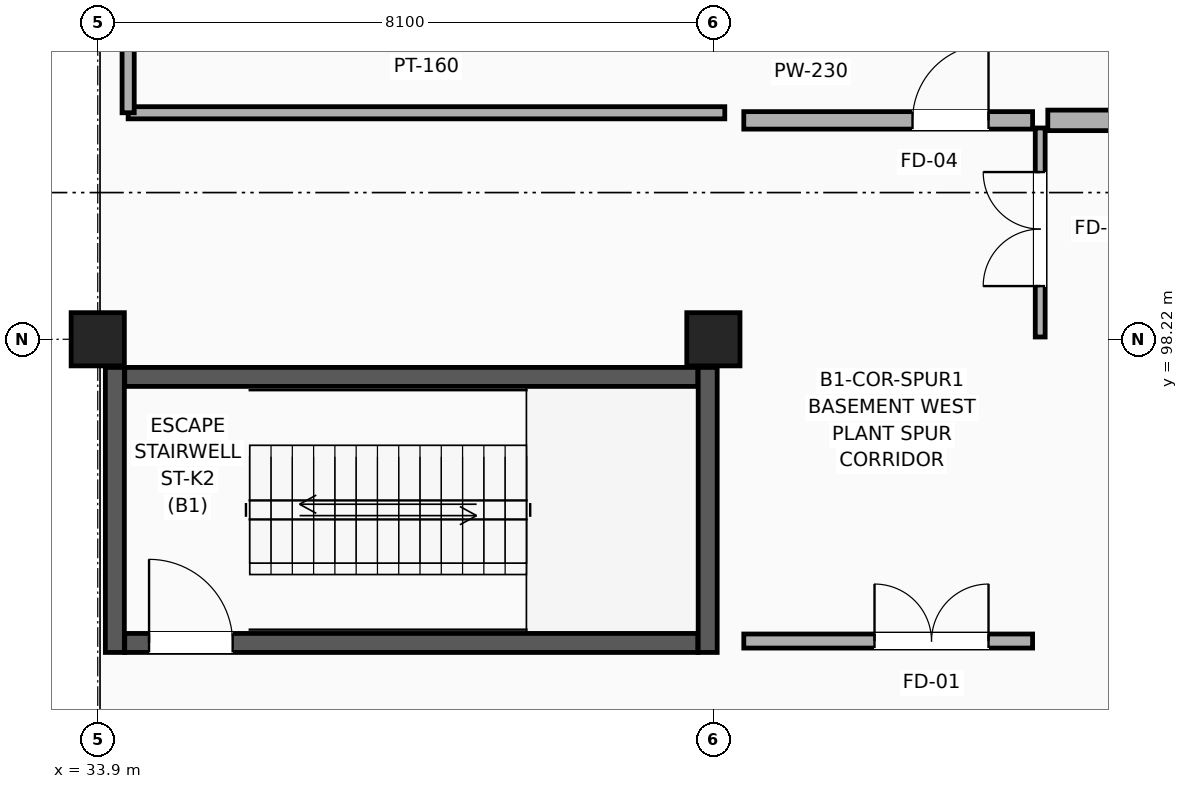
"""IFC4 building model, lengths in metres.
Left out: names, types, materials, properties, quantities, classifications, styles, units other than length and angle.
Written with IfcOpenShell. Run it as: python <this file> out.ifc"""

import sys

from ifc_helpers import new_model, si_unit, direction, frame, frame_2d, origin, origin_2d, place, context, subcontext, project, spatial, rectangle, extrude, element, fill, save


model = new_model("IFC4")
c1 = context("Model", 3, precision=1e-05, world=origin(), true_north=direction((0.0, 1.0)))
c2 = subcontext(c1, "Body", "Model", "MODEL_VIEW")
j1 = project(units=[si_unit("LENGTHUNIT", "METRE"), si_unit("PLANEANGLEUNIT", "RADIAN")], contexts=[c1])
p1 = place(None, origin())
s1 = spatial("IfcSite", under=j1, at=p1, CompositionType="ELEMENT")
p2 = place(p1, origin())
s2 = spatial("IfcBuilding", under=s1, at=p2, CompositionType="ELEMENT")
p3 = place(p2, frame((0.0, 0.0, -4.8)))
s3 = spatial("IfcBuildingStorey", under=s2, at=p3, CompositionType="ELEMENT", Elevation=-4.8)
for number, where, z_axis, x_axis in (
    (1, (33.9, 98.22, 0.0), (0.0, 0.0, 1.0), (1.0, 0.0, 0.0)),
    (2, (42.0, 98.22, 0.0), (0.0, 0.0, 1.0), (1.0, 0.0, 0.0)),
):
    element("IfcColumn", number, at=place(p3, frame(where, z_axis=z_axis, x_axis=x_axis)), inside=s3, PredefinedType="COLUMN", context=c2, shape_type="SweptSolid", body=[
        extrude(rectangle(XDim=0.7, YDim=0.7, at=origin_2d()), origin(), (0.0, 0.0, 1.0), 4.8),
    ])
p4 = place(p3, frame((34.255, 94.225, 0.0), z_axis=(0.0, 0.0, 1.0), x_axis=(1.0, 0.0, 0.0)))
e3 = element("IfcWall", 3, at=p4, inside=s3, PredefinedType="SHEAR", context=c2, shape_type="SweptSolid", body=[
    extrude(rectangle(XDim=7.54, YDim=0.25, at=frame_2d((3.77, 0.0))), origin(), (0.0, 0.0, 1.0), 4.48),
])
p5 = place(p4, frame((0.32, 0.0, 0.0)))
e4 = element("IfcOpeningElement", 4, at=p5, cuts=e3, PredefinedType="OPENING", context=c2, shape_type="SweptSolid", body=[
    extrude(rectangle(XDim=1.1, YDim=2.2, at=frame_2d((0.55, 1.1))), frame((0.0, 0.135, 0.0), z_axis=(0.0, -1.0, 0.0), x_axis=(1.0, 0.0, 0.0)), (0.0, 0.0, 1.0), 0.27),
])
p6 = place(p3, frame((34.255, 97.725, 0.0), z_axis=(0.0, 0.0, 1.0), x_axis=(1.0, 0.0, 0.0)))
e5 = element("IfcWall", 5, at=p6, inside=s3, PredefinedType="SHEAR", context=c2, shape_type="SweptSolid", body=[
    extrude(rectangle(XDim=7.54, YDim=0.25, at=frame_2d((3.77, 0.0))), origin(), (0.0, 0.0, 1.0), 4.48),
])
for number, where, z_axis, x_axis in (
    (6, (34.125, 94.1, 0.0), (0.0, 0.0, 1.0), (0.0, 1.0, 0.0)),
    (7, (41.925, 94.1, 0.0), (0.0, 0.0, 1.0), (0.0, 1.0, 0.0)),
):
    element("IfcWall", number, at=place(p3, frame(where, z_axis=z_axis, x_axis=x_axis)), inside=s3, PredefinedType="SHEAR", context=c2, shape_type="SweptSolid", body=[
        extrude(rectangle(XDim=3.75, YDim=0.25, at=frame_2d((1.875, 0.0))), origin(), (0.0, 0.0, 1.0), 4.48),
    ])
p7 = place(p3, frame((42.4, 94.25, 0.0), z_axis=(0.0, 0.0, 1.0), x_axis=(1.0, 0.0, 0.0)))
e8 = element("IfcWall", 8, at=p7, inside=s3, PredefinedType="PARTITIONING", context=c2, shape_type="SweptSolid", body=[
    extrude(rectangle(XDim=3.8, YDim=0.185, at=frame_2d((1.9, 0.0))), origin(), (0.0, 0.0, 1.0), 4.162),
])
p8 = place(p7, frame((1.72, 0.0, 0.0)))
e9 = element("IfcOpeningElement", 9, at=p8, cuts=e8, PredefinedType="OPENING", context=c2, shape_type="SweptSolid", body=[
    extrude(rectangle(XDim=1.5, YDim=2.2, at=frame_2d((0.75, 1.1))), frame((0.0, 0.103, 0.0), z_axis=(0.0, -1.0, 0.0), x_axis=(1.0, 0.0, 0.0)), (0.0, 0.0, 1.0), 0.205),
])
p9 = place(p3, frame((46.3, 98.25, 0.0), z_axis=(0.0, 0.0, 1.0), x_axis=(0.0, 1.0, 0.0)))
e10 = element("IfcWall", 10, at=p9, inside=s3, PredefinedType="PARTITIONING", context=c2, shape_type="SweptSolid", body=[
    extrude(rectangle(XDim=2.75, YDim=0.13, at=frame_2d((1.375, 0.0))), origin(), (0.0, 0.0, 1.0), 3.512),
])
p10 = place(p9, frame((0.67, 0.0, 0.0)))
e11 = element("IfcOpeningElement", 11, at=p10, cuts=e10, PredefinedType="OPENING", context=c2, shape_type="SweptSolid", body=[
    extrude(rectangle(XDim=1.5, YDim=2.2, at=frame_2d((0.75, 1.1))), frame((0.0, 0.075, 0.0), z_axis=(0.0, -1.0, 0.0), x_axis=(1.0, 0.0, 0.0)), (0.0, 0.0, 1.0), 0.15),
])
p11 = place(p3, frame((42.4, 101.1, 0.0), z_axis=(0.0, 0.0, 1.0), x_axis=(1.0, 0.0, 0.0)))
e12 = element("IfcWall", 12, at=p11, inside=s3, PredefinedType="SOLIDWALL", context=c2, shape_type="SweptSolid", body=[
    extrude(rectangle(XDim=3.8, YDim=0.23, at=frame_2d((1.9, 0.0))), origin(), (0.0, 0.0, 1.0), 4.132),
])
p12 = place(p11, frame((2.22, 0.0, 0.0)))
e13 = element("IfcOpeningElement", 13, at=p12, cuts=e12, PredefinedType="OPENING", context=c2, shape_type="SweptSolid", body=[
    extrude(rectangle(XDim=1.0, YDim=2.15, at=frame_2d((0.5, 1.075))), frame((0.0, 0.125, 0.0), z_axis=(0.0, -1.0, 0.0), x_axis=(1.0, 0.0, 0.0)), (0.0, 0.0, 1.0), 0.25),
])
p13 = place(p3, frame((46.4, 101.1, 0.0), z_axis=(0.0, 0.0, 1.0), x_axis=(1.0, 0.0, 0.0)))
e14 = element("IfcWall", 14, at=p13, inside=s3, PredefinedType="SOLIDWALL", context=c2, shape_type="SweptSolid", body=[
    extrude(rectangle(XDim=10.6, YDim=0.27, at=frame_2d((5.3, 0.0))), origin(), (0.0, 0.0, 1.0), 3.712),
])
p14 = place(p13, frame((7.253, 0.0, 0.0)))
e15 = element("IfcOpeningElement", 15, at=p14, cuts=e14, PredefinedType="OPENING", context=c2, shape_type="SweptSolid", body=[
    extrude(rectangle(XDim=1.0, YDim=2.15, at=frame_2d((0.5, 1.075))), frame((0.0, 0.145, 0.0), z_axis=(0.0, -1.0, 0.0), x_axis=(1.0, 0.0, 0.0)), (0.0, 0.0, 1.0), 0.29),
])
p15 = place(p3, frame((34.3, 101.2, 0.0), z_axis=(0.0, 0.0, 1.0), x_axis=(1.0, 0.0, 0.0)))
e16 = element("IfcWall", 16, at=p15, inside=s3, PredefinedType="PARTITIONING", context=c2, shape_type="SweptSolid", body=[
    extrude(rectangle(XDim=7.85, YDim=0.16, at=frame_2d((3.925, 0.0))), origin(), (0.0, 0.0, 1.0), 3.712),
])
p16 = place(p3, frame((34.3, 101.2, 0.0), z_axis=(0.0, 0.0, 1.0), x_axis=(0.0, 1.0, 0.0)))
e17 = element("IfcWall", 17, at=p16, inside=s3, PredefinedType="PARTITIONING", context=c2, shape_type="SweptSolid", body=[
    extrude(rectangle(XDim=11.2, YDim=0.16, at=frame_2d((5.6, 0.0))), origin(), (0.0, 0.0, 1.0), 3.512),
])
p17 = place(p5, origin())
e18 = element("IfcDoor", 18, at=p17, inside=s3, OperationType="SINGLE_SWING_LEFT", PredefinedType="DOOR", context=c2, shape_type="SweptSolid", body=[
    extrude(rectangle(XDim=1.1, YDim=2.2, at=frame_2d((0.55, 1.1))), frame((0.0, 0.025, 0.0), z_axis=(0.0, -1.0, 0.0), x_axis=(1.0, 0.0, 0.0)), (0.0, 0.0, 1.0), 0.05),
])
fill(e4, e18)
p18 = place(p8, origin())
e19 = element("IfcDoor", 19, at=p18, inside=s3, OperationType="DOUBLE_DOOR_SINGLE_SWING", PredefinedType="DOOR", context=c2, shape_type="SweptSolid", body=[
    extrude(rectangle(XDim=1.5, YDim=2.2, at=frame_2d((0.75, 1.1))), frame((0.0, 0.025, 0.0), z_axis=(0.0, -1.0, 0.0), x_axis=(1.0, 0.0, 0.0)), (0.0, 0.0, 1.0), 0.05),
])
fill(e9, e19)
p19 = place(p10, origin())
e20 = element("IfcDoor", 20, at=p19, inside=s3, OperationType="DOUBLE_DOOR_SINGLE_SWING", PredefinedType="DOOR", context=c2, shape_type="SweptSolid", body=[
    extrude(rectangle(XDim=1.5, YDim=2.2, at=frame_2d((0.75, 1.1))), frame((0.0, 0.025, 0.0), z_axis=(0.0, -1.0, 0.0), x_axis=(1.0, 0.0, 0.0)), (0.0, 0.0, 1.0), 0.05),
])
fill(e11, e20)
p20 = place(p12, origin())
e21 = element("IfcDoor", 21, at=p20, inside=s3, OperationType="SINGLE_SWING_RIGHT", PredefinedType="DOOR", context=c2, shape_type="SweptSolid", body=[
    extrude(rectangle(XDim=1.0, YDim=2.15, at=frame_2d((0.5, 1.075))), frame((0.0, 0.025, 0.0), z_axis=(0.0, -1.0, 0.0), x_axis=(1.0, 0.0, 0.0)), (0.0, 0.0, 1.0), 0.05),
])
fill(e13, e21)
save(model, sys.argv[1])
